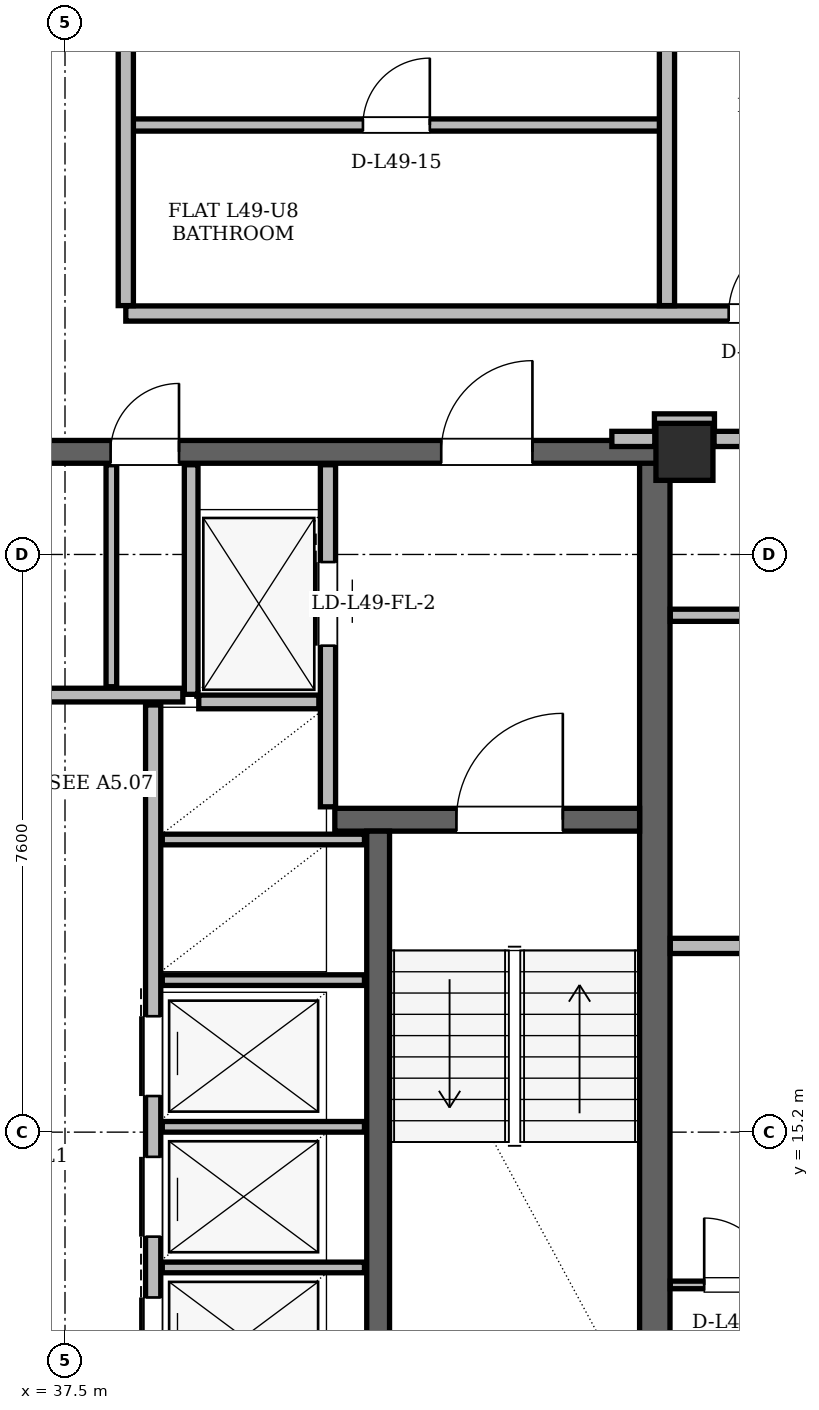
"""IFC4 building model, lengths in metres.
Left out: names, types, materials, properties, quantities, classifications, styles, units other than length and angle.
Written with IfcOpenShell. Run it as: python <this file> out.ifc"""

import sys

from ifc_helpers import new_model, si_unit, direction, frame, frame_2d, origin, origin_2d, place, context, subcontext, project, spatial, rectangle, hollow_rectangle, extrude, element, fill, save


model = new_model("IFC4")
c1 = context("Model", 3, precision=1e-05, world=origin(), true_north=direction((0.0, 1.0)))
c2 = subcontext(c1, "Body", "Model", "MODEL_VIEW")
j1 = project(units=[si_unit("LENGTHUNIT", "METRE"), si_unit("PLANEANGLEUNIT", "RADIAN")], contexts=[c1])
p1 = place(None, origin())
s1 = spatial("IfcSite", under=j1, at=p1, CompositionType="ELEMENT")
p2 = place(p1, origin())
s2 = spatial("IfcBuilding", under=s1, at=p2, CompositionType="ELEMENT")
p3 = place(p2, frame((0.0, 0.0, 185.4)))
s3 = spatial("IfcBuildingStorey", under=s2, at=p3, CompositionType="ELEMENT", Elevation=185.4)
p4 = place(p3, frame((45.65, 24.15, 0.0), z_axis=(0.0, 0.0, 1.0), x_axis=(1.0, 0.0, 0.0)))
e1 = element("IfcColumn", 1, at=p4, inside=s3, PredefinedType="COLUMN", context=c2, shape_type="SweptSolid", body=[
    extrude(hollow_rectangle(XDim=0.75, YDim=0.75, WallThickness=0.06, at=origin_2d()), origin(), (0.0, 0.0, 1.0), 3.6),
])
p5 = place(p3, frame((45.26, 11.0, 0.0), z_axis=(0.0, 0.0, 1.0), x_axis=(0.0, 1.0, 0.0)))
e2 = element("IfcWall", 2, at=p5, inside=s3, PredefinedType="SHEAR", context=c2, shape_type="SweptSolid", body=[
    extrude(rectangle(XDim=13.3, YDim=0.4, at=frame_2d((6.65, 0.0))), origin(), (0.0, 0.0, 1.0), 3.34),
])
p6 = place(p3, frame((29.65, 24.15, 0.0), z_axis=(0.0, 0.0, 1.0), x_axis=(1.0, 0.0, 0.0)))
e3 = element("IfcWall", 3, at=p6, inside=s3, PredefinedType="SHEAR", context=c2, shape_type="SweptSolid", body=[
    extrude(rectangle(XDim=15.7, YDim=0.3, at=frame_2d((7.85, 0.0))), origin(), (0.0, 0.0, 1.0), 3.34),
])
p7 = place(p6, frame((1.7, 0.0, 0.0)))
e4 = element("IfcOpeningElement", 4, at=p7, cuts=e3, PredefinedType="OPENING", context=c2, shape_type="SweptSolid", body=[
    extrude(rectangle(XDim=1.2, YDim=2.2, at=frame_2d((0.6, 1.1))), frame((0.0, 0.15, 0.0), z_axis=(0.0, -1.0, 0.0), x_axis=(1.0, 0.0, 0.0)), (0.0, 0.0, 1.0), 0.3),
])
p8 = place(p6, frame((12.8, 0.0, 0.0)))
e5 = element("IfcOpeningElement", 5, at=p8, cuts=e3, PredefinedType="OPENING", context=c2, shape_type="SweptSolid", body=[
    extrude(rectangle(XDim=1.2, YDim=2.2, at=frame_2d((0.6, 1.1))), frame((0.0, 0.15, 0.0), z_axis=(0.0, -1.0, 0.0), x_axis=(1.0, 0.0, 0.0)), (0.0, 0.0, 1.0), 0.3),
])
p9 = place(p6, frame((6.55, 0.0, 0.0)))
e6 = element("IfcOpeningElement", 6, at=p9, cuts=e3, PredefinedType="OPENING", context=c2, shape_type="SweptSolid", body=[
    extrude(rectangle(XDim=0.9, YDim=2.05, at=frame_2d((0.45, 1.025))), frame((0.0, 0.15, 0.0), z_axis=(0.0, -1.0, 0.0), x_axis=(1.0, 0.0, 0.0)), (0.0, 0.0, 1.0), 0.3),
])
p10 = place(p6, frame((8.45, 0.0, 0.0)))
e7 = element("IfcOpeningElement", 7, at=p10, cuts=e3, PredefinedType="OPENING", context=c2, shape_type="SweptSolid", body=[
    extrude(rectangle(XDim=0.9, YDim=2.05, at=frame_2d((0.45, 1.025))), frame((0.0, 0.15, 0.0), z_axis=(0.0, -1.0, 0.0), x_axis=(1.0, 0.0, 0.0)), (0.0, 0.0, 1.0), 0.3),
])
p11 = place(p3, frame((41.05, 19.31, 0.0), z_axis=(0.0, 0.0, 1.0), x_axis=(1.0, 0.0, 0.0)))
e8 = element("IfcWall", 8, at=p11, inside=s3, PredefinedType="SHEAR", context=c2, shape_type="SweptSolid", body=[
    extrude(rectangle(XDim=4.01, YDim=0.3, at=frame_2d((2.005, 0.0))), origin(), (0.0, 0.0, 1.0), 3.34),
])
p12 = place(p11, frame((1.6, 0.0, 0.0)))
e9 = element("IfcOpeningElement", 9, at=p12, cuts=e8, PredefinedType="OPENING", context=c2, shape_type="SweptSolid", body=[
    extrude(rectangle(XDim=1.4, YDim=2.2, at=frame_2d((0.7, 1.1))), frame((0.0, 0.15, 0.0), z_axis=(0.0, -1.0, 0.0), x_axis=(1.0, 0.0, 0.0)), (0.0, 0.0, 1.0), 0.3),
])
p13 = place(p3, frame((41.62, 11.54, 0.0), z_axis=(0.0, 0.0, 1.0), x_axis=(0.0, 1.0, 0.0)))
e10 = element("IfcWall", 10, at=p13, inside=s3, PredefinedType="SHEAR", context=c2, shape_type="SweptSolid", body=[
    extrude(rectangle(XDim=7.62, YDim=0.3, at=frame_2d((3.81, 0.0))), origin(), (0.0, 0.0, 1.0), 3.34),
])
p14 = place(p3, frame((59.519, 11.962, 0.0), z_axis=(0.0, 0.0, 1.0), x_axis=(-0.500007042689, 0.866021337648, 0.0)))
e11 = element("IfcWall", 11, at=p14, inside=s3, PredefinedType="SOLIDWALL", context=c2, shape_type="SweptSolid", body=[
    extrude(rectangle(XDim=36.115, YDim=0.29, at=frame_2d((18.057, 0.0))), origin(), (0.0, 0.0, 1.0), 2.56),
])
p15 = place(p14, frame((8.034, 0.0, 0.0)))
e12 = element("IfcOpeningElement", 12, at=p15, cuts=e11, PredefinedType="OPENING", context=c2, shape_type="SweptSolid", body=[
    extrude(rectangle(XDim=1.5, YDim=2.2, at=frame_2d((0.75, 1.1))), frame((0.0, 0.145, 0.0), z_axis=(0.0, -1.0, 0.0), x_axis=(1.0, 0.0, 0.0)), (0.0, 0.0, 1.0), 0.29),
])
p16 = place(p14, frame((28.035, 0.0, 0.0)))
e13 = element("IfcOpeningElement", 13, at=p16, cuts=e11, PredefinedType="OPENING", context=c2, shape_type="SweptSolid", body=[
    extrude(rectangle(XDim=1.5, YDim=2.2, at=frame_2d((0.75, 1.1))), frame((0.0, 0.145, 0.0), z_axis=(0.0, -1.0, 0.0), x_axis=(1.0, 0.0, 0.0)), (0.0, 0.0, 1.0), 0.29),
])
p17 = place(p14, frame((2.16, 0.0, 0.85)))
e14 = element("IfcOpeningElement", 14, at=p17, cuts=e11, PredefinedType="OPENING", context=c2, shape_type="SweptSolid", body=[
    extrude(rectangle(XDim=1.4, YDim=1.6, at=frame_2d((0.7, 0.8))), frame((0.0, 0.145, 0.0), z_axis=(0.0, -1.0, 0.0), x_axis=(1.0, 0.0, 0.0)), (0.0, 0.0, 1.0), 0.29),
])
p18 = place(p14, frame((14.363, 0.0, 0.85)))
e15 = element("IfcOpeningElement", 15, at=p18, cuts=e11, PredefinedType="OPENING", context=c2, shape_type="SweptSolid", body=[
    extrude(rectangle(XDim=1.2, YDim=1.48, at=frame_2d((0.6, 0.74))), frame((0.0, 0.145, 0.0), z_axis=(0.0, -1.0, 0.0), x_axis=(1.0, 0.0, 0.0)), (0.0, 0.0, 1.0), 0.29),
])
p19 = place(p14, frame((21.574, 0.0, 0.85)))
e16 = element("IfcOpeningElement", 16, at=p19, cuts=e11, PredefinedType="OPENING", context=c2, shape_type="SweptSolid", body=[
    extrude(rectangle(XDim=2.8, YDim=1.6, at=frame_2d((1.4, 0.8))), frame((0.0, 0.145, 0.0), z_axis=(0.0, -1.0, 0.0), x_axis=(1.0, 0.0, 0.0)), (0.0, 0.0, 1.0), 0.29),
])
p20 = place(p14, frame((32.304, 0.0, 0.85)))
e17 = element("IfcOpeningElement", 17, at=p20, cuts=e11, PredefinedType="OPENING", context=c2, shape_type="SweptSolid", body=[
    extrude(rectangle(XDim=1.6, YDim=1.6, at=frame_2d((0.8, 0.8))), frame((0.0, 0.145, 0.0), z_axis=(0.0, -1.0, 0.0), x_axis=(1.0, 0.0, 0.0)), (0.0, 0.0, 1.0), 0.29),
])
p21 = place(p3, frame((40.96, 19.48, 0.0), z_axis=(0.0, 0.0, 1.0), x_axis=(0.0, 1.0, 0.0)))
e18 = element("IfcWall", 18, at=p21, inside=s3, PredefinedType="PARTITIONING", context=c2, shape_type="SweptSolid", body=[
    extrude(rectangle(XDim=4.5, YDim=0.2, at=frame_2d((2.25, 0.0))), origin(), (0.0, 0.0, 1.0), 3.34),
])
p22 = place(p21, frame((2.12, 0.0, 0.0)))
e19 = element("IfcOpeningElement", 19, at=p22, cuts=e18, PredefinedType="OPENING", context=c2, shape_type="SweptSolid", body=[
    extrude(rectangle(XDim=1.1, YDim=2.2, at=frame_2d((0.55, 1.1))), frame((0.0, 0.1, 0.0), z_axis=(0.0, -1.0, 0.0), x_axis=(1.0, 0.0, 0.0)), (0.0, 0.0, 1.0), 0.2),
])
p23 = place(p3, frame((39.16, 20.96, 0.0), z_axis=(0.0, 0.0, 1.0), x_axis=(0.0, 1.0, 0.0)))
e20 = element("IfcWall", 20, at=p23, inside=s3, PredefinedType="PARTITIONING", context=c2, shape_type="SweptSolid", body=[
    extrude(rectangle(XDim=3.02, YDim=0.18, at=frame_2d((1.51, 0.0))), origin(), (0.0, 0.0, 1.0), 3.34),
])
p24 = place(p3, frame((39.26, 20.86, 0.0), z_axis=(0.0, 0.0, 1.0), x_axis=(1.0, 0.0, 0.0)))
e21 = element("IfcWall", 21, at=p24, inside=s3, PredefinedType="PARTITIONING", context=c2, shape_type="SweptSolid", body=[
    extrude(rectangle(XDim=1.58, YDim=0.18, at=frame_2d((0.79, 0.0))), origin(), (0.0, 0.0, 1.0), 3.34),
])
p25 = place(p3, frame((38.66, 11.72, 0.0), z_axis=(0.0, 0.0, 1.0), x_axis=(0.0, 1.0, 0.0)))
e22 = element("IfcWall", 22, at=p25, inside=s3, PredefinedType="PARTITIONING", context=c2, shape_type="SweptSolid", body=[
    extrude(rectangle(XDim=9.1, YDim=0.2, at=frame_2d((4.55, 0.0))), origin(), (0.0, 0.0, 1.0), 3.34),
])
p26 = place(p25, frame((0.255, 0.0, 0.0)))
e23 = element("IfcOpeningElement", 23, at=p26, cuts=e22, PredefinedType="OPENING", context=c2, shape_type="SweptSolid", body=[
    extrude(rectangle(XDim=1.05, YDim=2.15, at=frame_2d((0.525, 1.075))), frame((0.0, 0.1, 0.0), z_axis=(0.0, -1.0, 0.0), x_axis=(1.0, 0.0, 0.0)), (0.0, 0.0, 1.0), 0.2),
])
p27 = place(p25, frame((2.105, 0.0, 0.0)))
e24 = element("IfcOpeningElement", 24, at=p27, cuts=e22, PredefinedType="OPENING", context=c2, shape_type="SweptSolid", body=[
    extrude(rectangle(XDim=1.05, YDim=2.15, at=frame_2d((0.525, 1.075))), frame((0.0, 0.1, 0.0), z_axis=(0.0, -1.0, 0.0), x_axis=(1.0, 0.0, 0.0)), (0.0, 0.0, 1.0), 0.2),
])
p28 = place(p25, frame((3.955, 0.0, 0.0)))
e25 = element("IfcOpeningElement", 25, at=p28, cuts=e22, PredefinedType="OPENING", context=c2, shape_type="SweptSolid", body=[
    extrude(rectangle(XDim=1.05, YDim=2.15, at=frame_2d((0.525, 1.075))), frame((0.0, 0.1, 0.0), z_axis=(0.0, -1.0, 0.0), x_axis=(1.0, 0.0, 0.0)), (0.0, 0.0, 1.0), 0.2),
])
for number, where, z_axis, x_axis in (
    (26, (38.78, 13.42, 0.0), (0.0, 0.0, 1.0), (1.0, 0.0, 0.0)),
    (27, (38.78, 15.27, 0.0), (0.0, 0.0, 1.0), (1.0, 0.0, 0.0)),
    (28, (38.78, 17.2, 0.0), (0.0, 0.0, 1.0), (1.0, 0.0, 0.0)),
    (29, (38.78, 19.05, 0.0), (0.0, 0.0, 1.0), (1.0, 0.0, 0.0)),
):
    element("IfcWall", number, at=place(p3, frame(where, z_axis=z_axis, x_axis=x_axis)), inside=s3, PredefinedType="PARTITIONING", context=c2, shape_type="SweptSolid", body=[
        extrude(rectangle(XDim=2.66, YDim=0.14, at=frame_2d((1.33, 0.0))), origin(), (0.0, 0.0, 1.0), 3.34),
    ])
p29 = place(p3, frame((35.95, 20.95, 0.0), z_axis=(0.0, 0.0, 1.0), x_axis=(1.0, 0.0, 0.0)))
e30 = element("IfcWall", 30, at=p29, inside=s3, PredefinedType="PARTITIONING", context=c2, shape_type="SweptSolid", body=[
    extrude(rectangle(XDim=3.1, YDim=0.18, at=frame_2d((1.55, 0.0))), origin(), (0.0, 0.0, 1.0), 3.34),
])
p30 = place(p3, frame((38.11, 21.06, 0.0), z_axis=(0.0, 0.0, 1.0), x_axis=(0.0, 1.0, 0.0)))
e31 = element("IfcWall", 31, at=p30, inside=s3, PredefinedType="PARTITIONING", context=c2, shape_type="SweptSolid", body=[
    extrude(rectangle(XDim=2.92, YDim=0.14, at=frame_2d((1.46, 0.0))), origin(), (0.0, 0.0, 1.0), 3.34),
])
p31 = place(p3, frame((45.464, 13.19, 0.0), z_axis=(0.0, 0.0, 1.0), x_axis=(1.0, 0.0, 0.0)))
e32 = element("IfcWall", 32, at=p31, inside=s3, PredefinedType="PARTITIONING", context=c2, shape_type="SweptSolid", body=[
    extrude(rectangle(XDim=13.173, YDim=0.1, at=frame_2d((6.587, 0.0))), origin(), (0.0, 0.0, 1.0), 2.48),
])
p32 = place(p31, frame((0.446, 0.0, 0.0)))
e33 = element("IfcOpeningElement", 33, at=p32, cuts=e32, PredefinedType="OPENING", context=c2, shape_type="SweptSolid", body=[
    extrude(rectangle(XDim=0.88, YDim=2.08, at=frame_2d((0.44, 1.04))), frame((0.0, 0.05, 0.0), z_axis=(0.0, -1.0, 0.0), x_axis=(1.0, 0.0, 0.0)), (0.0, 0.0, 1.0), 0.1),
])
p33 = place(p31, frame((2.396, 0.0, 0.0)))
e34 = element("IfcOpeningElement", 34, at=p33, cuts=e32, PredefinedType="OPENING", context=c2, shape_type="SweptSolid", body=[
    extrude(rectangle(XDim=0.95, YDim=2.1, at=frame_2d((0.475, 1.05))), frame((0.0, 0.05, 0.0), z_axis=(0.0, -1.0, 0.0), x_axis=(1.0, 0.0, 0.0)), (0.0, 0.0, 1.0), 0.1),
])
p34 = place(p31, frame((8.09, 0.0, 0.0)))
e35 = element("IfcOpeningElement", 35, at=p34, cuts=e32, PredefinedType="OPENING", context=c2, shape_type="SweptSolid", body=[
    extrude(rectangle(XDim=0.92, YDim=2.12, at=frame_2d((0.46, 1.06))), frame((0.0, 0.05, 0.0), z_axis=(0.0, -1.0, 0.0), x_axis=(1.0, 0.0, 0.0)), (0.0, 0.0, 1.0), 0.1),
])
p35 = place(p3, frame((45.464, 17.65, 0.0), z_axis=(0.0, 0.0, 1.0), x_axis=(1.0, 0.0, 0.0)))
e36 = element("IfcWall", 36, at=p35, inside=s3, PredefinedType="PARTITIONING", context=c2, shape_type="SweptSolid", body=[
    extrude(rectangle(XDim=10.598, YDim=0.2, at=frame_2d((5.299, 0.0))), origin(), (0.0, 0.0, 1.0), 2.48),
])
p36 = place(p3, frame((45.464, 22.0, 0.0), z_axis=(0.0, 0.0, 1.0), x_axis=(1.0, 0.0, 0.0)))
e37 = element("IfcWall", 37, at=p36, inside=s3, PredefinedType="PARTITIONING", context=c2, shape_type="SweptSolid", body=[
    extrude(rectangle(XDim=8.087, YDim=0.16, at=frame_2d((4.043, 0.0))), origin(), (0.0, 0.0, 1.0), 2.48),
])
p37 = place(p36, frame((1.576, 0.0, 0.0)))
e38 = element("IfcOpeningElement", 38, at=p37, cuts=e37, PredefinedType="OPENING", context=c2, shape_type="SweptSolid", body=[
    extrude(rectangle(XDim=0.92, YDim=2.12, at=frame_2d((0.46, 1.06))), frame((0.0, 0.08, 0.0), z_axis=(0.0, -1.0, 0.0), x_axis=(1.0, 0.0, 0.0)), (0.0, 0.0, 1.0), 0.16),
])
p38 = place(p36, frame((4.696, 0.0, 0.0)))
e39 = element("IfcOpeningElement", 39, at=p38, cuts=e37, PredefinedType="OPENING", context=c2, shape_type="SweptSolid", body=[
    extrude(rectangle(XDim=0.95, YDim=2.1, at=frame_2d((0.475, 1.05))), frame((0.0, 0.08, 0.0), z_axis=(0.0, -1.0, 0.0), x_axis=(1.0, 0.0, 0.0)), (0.0, 0.0, 1.0), 0.16),
])
p39 = place(p36, frame((6.546, 0.0, 0.0)))
e40 = element("IfcOpeningElement", 40, at=p39, cuts=e37, PredefinedType="OPENING", context=c2, shape_type="SweptSolid", body=[
    extrude(rectangle(XDim=0.88, YDim=2.08, at=frame_2d((0.44, 1.04))), frame((0.0, 0.08, 0.0), z_axis=(0.0, -1.0, 0.0), x_axis=(1.0, 0.0, 0.0)), (0.0, 0.0, 1.0), 0.16),
])
p40 = place(p3, frame((44.695, 24.32, 0.0), z_axis=(0.0, 0.0, 1.0), x_axis=(1.0, 0.0, 0.0)))
e41 = element("IfcWall", 41, at=p40, inside=s3, PredefinedType="PARTITIONING", context=c2, shape_type="SweptSolid", body=[
    extrude(rectangle(XDim=0.565, YDim=0.2, at=frame_2d((0.282, 0.0))), origin(), (0.0, 0.0, 1.0), 2.48),
])
p41 = place(p3, frame((46.04, 24.32, 0.0), z_axis=(0.0, 0.0, 1.0), x_axis=(1.0, 0.0, 0.0)))
e42 = element("IfcWall", 42, at=p41, inside=s3, PredefinedType="PARTITIONING", context=c2, shape_type="SweptSolid", body=[
    extrude(rectangle(XDim=2.76, YDim=0.2, at=frame_2d((1.38, 0.0))), origin(), (0.0, 0.0, 1.0), 3.34),
])
p42 = place(p3, frame((45.255, 24.55, 0.0), z_axis=(0.0, 0.0, 1.0), x_axis=(1.0, 0.0, 0.0)))
e43 = element("IfcWall", 43, at=p42, inside=s3, PredefinedType="PARTITIONING", context=c2, shape_type="SweptSolid", body=[
    extrude(rectangle(XDim=0.79, YDim=0.2, at=frame_2d((0.395, 0.0))), origin(), (0.0, 0.0, 1.0), 2.802),
])
p43 = place(p3, frame((38.3, 25.97, 0.0), z_axis=(0.0, 0.0, 1.0), x_axis=(1.0, 0.0, 0.0)))
e44 = element("IfcWall", 44, at=p43, inside=s3, PredefinedType="PARTITIONING", context=c2, shape_type="SweptSolid", body=[
    extrude(rectangle(XDim=10.5, YDim=0.2, at=frame_2d((5.25, 0.0))), origin(), (0.0, 0.0, 1.0), 2.802),
])
p44 = place(p43, frame((7.932, 0.0, 0.0)))
e45 = element("IfcOpeningElement", 45, at=p44, cuts=e44, PredefinedType="OPENING", context=c2, shape_type="SweptSolid", body=[
    extrude(rectangle(XDim=1.0, YDim=2.18, at=frame_2d((0.5, 1.09))), frame((0.0, 0.1, 0.0), z_axis=(0.0, -1.0, 0.0), x_axis=(1.0, 0.0, 0.0)), (0.0, 0.0, 1.0), 0.2),
])
p45 = place(p3, frame((38.218, 28.45, 0.0), z_axis=(0.0, 0.0, 1.0), x_axis=(1.0, 0.0, 0.0)))
e46 = element("IfcWall", 46, at=p45, inside=s3, PredefinedType="PARTITIONING", context=c2, shape_type="SweptSolid", body=[
    extrude(rectangle(XDim=7.284, YDim=0.16, at=frame_2d((3.642, 0.0))), origin(), (0.0, 0.0, 1.0), 2.802),
])
p46 = place(p45, frame((3.202, 0.0, 0.0)))
e47 = element("IfcOpeningElement", 47, at=p46, cuts=e46, PredefinedType="OPENING", context=c2, shape_type="SweptSolid", body=[
    extrude(rectangle(XDim=0.88, YDim=2.08, at=frame_2d((0.44, 1.04))), frame((0.0, 0.08, 0.0), z_axis=(0.0, -1.0, 0.0), x_axis=(1.0, 0.0, 0.0)), (0.0, 0.0, 1.0), 0.16),
])
p47 = place(p3, frame((38.3, 26.074, 0.0), z_axis=(0.0, 0.0, 1.0), x_axis=(0.0, 1.0, 0.0)))
e48 = element("IfcWall", 48, at=p47, inside=s3, PredefinedType="PARTITIONING", context=c2, shape_type="SweptSolid", body=[
    extrude(rectangle(XDim=6.022, YDim=0.2, at=frame_2d((3.011, 0.0))), origin(), (0.0, 0.0, 1.0), 3.34),
])
p48 = place(p47, frame((3.656, 0.0, 0.0)))
e49 = element("IfcOpeningElement", 49, at=p48, cuts=e48, PredefinedType="OPENING", context=c2, shape_type="SweptSolid", body=[
    extrude(rectangle(XDim=1.0, YDim=2.18, at=frame_2d((0.5, 1.09))), frame((0.0, 0.1, 0.0), z_axis=(0.0, -1.0, 0.0), x_axis=(1.0, 0.0, 0.0)), (0.0, 0.0, 1.0), 0.2),
])
p49 = place(p3, frame((45.42, 26.074, 0.0), z_axis=(0.0, 0.0, 1.0), x_axis=(0.0, 1.0, 0.0)))
e50 = element("IfcWall", 50, at=p49, inside=s3, PredefinedType="PARTITIONING", context=c2, shape_type="SweptSolid", body=[
    extrude(rectangle(XDim=10.009, YDim=0.2, at=frame_2d((5.005, 0.0))), origin(), (0.0, 0.0, 1.0), 2.56),
])
p50 = place(p22, origin())
e51 = element("IfcDoor", 51, at=p50, inside=s3, OperationType="SLIDING_TO_RIGHT", PredefinedType="DOOR", context=c2, shape_type="SweptSolid", body=[
    extrude(rectangle(XDim=1.1, YDim=2.2, at=frame_2d((0.55, 1.1))), frame((0.0, 0.025, 0.0), z_axis=(0.0, -1.0, 0.0), x_axis=(1.0, 0.0, 0.0)), (0.0, 0.0, 1.0), 0.05),
])
fill(e19, e51)
p51 = place(p26, origin())
e52 = element("IfcDoor", 52, at=p51, inside=s3, OperationType="SLIDING_TO_RIGHT", PredefinedType="DOOR", context=c2, shape_type="SweptSolid", body=[
    extrude(rectangle(XDim=1.05, YDim=2.15, at=frame_2d((0.525, 1.075))), frame((0.0, 0.025, 0.0), z_axis=(0.0, -1.0, 0.0), x_axis=(1.0, 0.0, 0.0)), (0.0, 0.0, 1.0), 0.05),
])
fill(e23, e52)
p52 = place(p27, origin())
e53 = element("IfcDoor", 53, at=p52, inside=s3, OperationType="SLIDING_TO_LEFT", PredefinedType="DOOR", context=c2, shape_type="SweptSolid", body=[
    extrude(rectangle(XDim=1.05, YDim=2.15, at=frame_2d((0.525, 1.075))), frame((0.0, 0.025, 0.0), z_axis=(0.0, -1.0, 0.0), x_axis=(1.0, 0.0, 0.0)), (0.0, 0.0, 1.0), 0.05),
])
fill(e24, e53)
p53 = place(p28, origin())
e54 = element("IfcDoor", 54, at=p53, inside=s3, OperationType="SLIDING_TO_RIGHT", PredefinedType="DOOR", context=c2, shape_type="SweptSolid", body=[
    extrude(rectangle(XDim=1.05, YDim=2.15, at=frame_2d((0.525, 1.075))), frame((0.0, 0.025, 0.0), z_axis=(0.0, -1.0, 0.0), x_axis=(1.0, 0.0, 0.0)), (0.0, 0.0, 1.0), 0.05),
])
fill(e25, e54)
p54 = place(p12, origin())
e55 = element("IfcDoor", 55, at=p54, inside=s3, OperationType="SINGLE_SWING_RIGHT", PredefinedType="DOOR", context=c2, shape_type="SweptSolid", body=[
    extrude(rectangle(XDim=1.4, YDim=2.2, at=frame_2d((0.7, 1.1))), frame((0.0, 0.025, 0.0), z_axis=(0.0, -1.0, 0.0), x_axis=(1.0, 0.0, 0.0)), (0.0, 0.0, 1.0), 0.05),
])
fill(e9, e55)
p55 = place(p8, origin())
e56 = element("IfcDoor", 56, at=p55, inside=s3, OperationType="SINGLE_SWING_RIGHT", PredefinedType="DOOR", context=c2, shape_type="SweptSolid", body=[
    extrude(rectangle(XDim=1.2, YDim=2.2, at=frame_2d((0.6, 1.1))), frame((0.0, 0.025, 0.0), z_axis=(0.0, -1.0, 0.0), x_axis=(1.0, 0.0, 0.0)), (0.0, 0.0, 1.0), 0.05),
])
fill(e5, e56)
p56 = place(p10, origin())
e57 = element("IfcDoor", 57, at=p56, inside=s3, OperationType="SINGLE_SWING_RIGHT", PredefinedType="DOOR", context=c2, shape_type="SweptSolid", body=[
    extrude(rectangle(XDim=0.9, YDim=2.05, at=frame_2d((0.45, 1.025))), frame((0.0, 0.025, 0.0), z_axis=(0.0, -1.0, 0.0), x_axis=(1.0, 0.0, 0.0)), (0.0, 0.0, 1.0), 0.05),
])
fill(e7, e57)
p57 = place(p32, origin())
e58 = element("IfcDoor", 58, at=p57, inside=s3, OperationType="SINGLE_SWING_LEFT", PredefinedType="DOOR", context=c2, shape_type="SweptSolid", body=[
    extrude(rectangle(XDim=0.88, YDim=2.08, at=frame_2d((0.44, 1.04))), frame((0.0, 0.025, 0.0), z_axis=(0.0, -1.0, 0.0), x_axis=(1.0, 0.0, 0.0)), (0.0, 0.0, 1.0), 0.05),
])
fill(e33, e58)
p58 = place(p44, origin())
e59 = element("IfcDoor", 59, at=p58, inside=s3, OperationType="SINGLE_SWING_RIGHT", PredefinedType="DOOR", context=c2, shape_type="SweptSolid", body=[
    extrude(rectangle(XDim=1.0, YDim=2.18, at=frame_2d((0.5, 1.09))), frame((0.0, 0.025, 0.0), z_axis=(0.0, -1.0, 0.0), x_axis=(1.0, 0.0, 0.0)), (0.0, 0.0, 1.0), 0.05),
])
fill(e45, e59)
p59 = place(p46, origin())
e60 = element("IfcDoor", 60, at=p59, inside=s3, OperationType="SINGLE_SWING_RIGHT", PredefinedType="DOOR", context=c2, shape_type="SweptSolid", body=[
    extrude(rectangle(XDim=0.88, YDim=2.08, at=frame_2d((0.44, 1.04))), frame((0.0, 0.025, 0.0), z_axis=(0.0, -1.0, 0.0), x_axis=(1.0, 0.0, 0.0)), (0.0, 0.0, 1.0), 0.05),
])
fill(e47, e60)
save(model, sys.argv[1])
